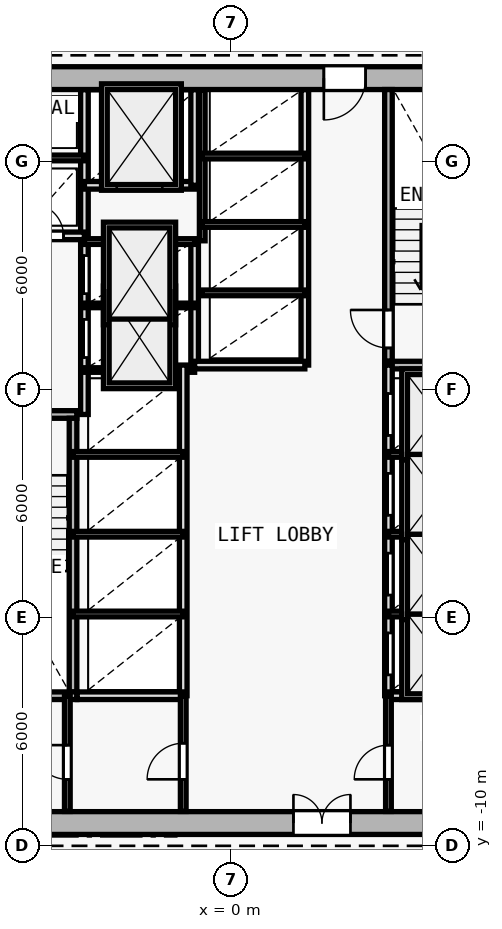
"""IFC4 building model, lengths in metres.
Left out: names, types, materials, properties, quantities, classifications, styles, units other than length and angle.
Written with IfcOpenShell. Run it as: python <this file> out.ifc"""

import sys

from ifc_helpers import new_model, si_unit, direction, frame, frame_2d, origin, origin_2d, place, context, subcontext, project, spatial, rectangle, i_section, extrude, element, fill, save


model = new_model("IFC4")
c1 = context("Model", 3, precision=1e-05, world=origin(), true_north=direction((0.0, 1.0)))
c2 = subcontext(c1, "Body", "Model", "MODEL_VIEW")
j1 = project(units=[si_unit("LENGTHUNIT", "METRE"), si_unit("PLANEANGLEUNIT", "RADIAN")], contexts=[c1])
p1 = place(None, origin())
s1 = spatial("IfcSite", under=j1, at=p1, CompositionType="ELEMENT")
p2 = place(p1, origin())
s2 = spatial("IfcBuilding", under=s1, at=p2, CompositionType="ELEMENT")
p3 = place(p2, frame((0.0, 0.0, 30.0)))
s3 = spatial("IfcBuildingStorey", under=s2, at=p3, CompositionType="ELEMENT", Elevation=30.0)
p4 = place(p3, frame((0.0, -9.4, 0.0), z_axis=(0.0, 0.0, 1.0), x_axis=(1.0, 0.0, 0.0)))
e1 = element("IfcColumn", 1, at=p4, inside=s3, PredefinedType="COLUMN", context=c2, shape_type="SweptSolid", body=[
    extrude(i_section(OverallWidth=0.416, OverallDepth=0.446, WebThickness=0.025, FlangeThickness=0.04, FilletRadius=0.015, at=origin_2d()), origin(), (0.0, 0.0, 1.0), 3.6),
])
p5 = place(p3, frame((-8.0, -9.4, 0.0), z_axis=(0.0, 0.0, 1.0), x_axis=(1.0, 0.0, 0.0)))
e2 = element("IfcWall", 2, at=p5, inside=s3, PredefinedType="SHEAR", context=c2, shape_type="SweptSolid", body=[
    extrude(rectangle(XDim=16.0, YDim=0.6, at=frame_2d((8.0, 0.0))), origin(), (0.0, 0.0, 1.0), 3.35),
])
p6 = place(p5, frame((9.65, 0.0, 0.0)))
e3 = element("IfcOpeningElement", 3, at=p6, cuts=e2, PredefinedType="OPENING", context=c2, shape_type="SweptSolid", body=[
    extrude(rectangle(XDim=1.5, YDim=2.2, at=frame_2d((0.75, 1.1))), frame((0.0, 0.31, 0.0), z_axis=(0.0, -1.0, 0.0), x_axis=(1.0, 0.0, 0.0)), (0.0, 0.0, 1.0), 0.62),
])
p7 = place(p3, frame((8.0, 10.2, 0.0), z_axis=(0.0, 0.0, 1.0), x_axis=(-1.0, 0.0, 0.0)))
e4 = element("IfcWall", 4, at=p7, inside=s3, PredefinedType="SHEAR", context=c2, shape_type="SweptSolid", body=[
    extrude(rectangle(XDim=16.0, YDim=0.6, at=frame_2d((8.0, 0.0))), origin(), (0.0, 0.0, 1.0), 3.35),
])
p8 = place(p7, frame((4.45, 0.0, 0.0)))
e5 = element("IfcOpeningElement", 5, at=p8, cuts=e4, PredefinedType="OPENING", context=c2, shape_type="SweptSolid", body=[
    extrude(rectangle(XDim=1.1, YDim=2.15, at=frame_2d((0.55, 1.075))), frame((0.0, 0.31, 0.0), z_axis=(0.0, -1.0, 0.0), x_axis=(1.0, 0.0, 0.0)), (0.0, 0.0, 1.0), 0.62),
])
p9 = place(p3, frame((-7.4, 1.35, 0.0), z_axis=(0.0, 0.0, 1.0), x_axis=(1.0, 0.0, 0.0)))
e6 = element("IfcWall", 6, at=p9, inside=s3, PredefinedType="SOLIDWALL", context=c2, shape_type="SweptSolid", body=[
    extrude(rectangle(XDim=3.35, YDim=0.2, at=frame_2d((1.675, 0.0))), origin(), (0.0, 0.0, 1.0), 3.35),
])
p10 = place(p9, frame((0.65, 0.0, 0.0)))
e7 = element("IfcOpeningElement", 7, at=p10, cuts=e6, PredefinedType="OPENING", context=c2, shape_type="SweptSolid", body=[
    extrude(rectangle(XDim=1.0, YDim=2.15, at=frame_2d((0.5, 1.075))), frame((0.0, 0.11, 0.0), z_axis=(0.0, -1.0, 0.0), x_axis=(1.0, 0.0, 0.0)), (0.0, 0.0, 1.0), 0.22),
])
p11 = place(p3, frame((-4.15, -5.95, 0.0), z_axis=(0.0, 0.0, 1.0), x_axis=(0.0, 1.0, 0.0)))
e8 = element("IfcWall", 8, at=p11, inside=s3, PredefinedType="SOLIDWALL", context=c2, shape_type="SweptSolid", body=[
    extrude(rectangle(XDim=7.2, YDim=0.2, at=frame_2d((3.6, 0.0))), origin(), (0.0, 0.0, 1.0), 3.35),
])
p12 = place(p3, frame((-3.85, 1.35, 0.0), z_axis=(0.0, 0.0, 1.0), x_axis=(0.0, 1.0, 0.0)))
e9 = element("IfcWall", 9, at=p12, inside=s3, PredefinedType="SOLIDWALL", context=c2, shape_type="SweptSolid", body=[
    extrude(rectangle(XDim=8.545, YDim=0.2, at=frame_2d((4.272, 0.0))), origin(), (0.0, 0.0, 1.0), 3.35),
])
p13 = place(p12, frame((1.5, 0.0, 0.0)))
e10 = element("IfcOpeningElement", 10, at=p13, cuts=e9, PredefinedType="OPENING", context=c2, shape_type="SweptSolid", body=[
    extrude(rectangle(XDim=1.0, YDim=2.15, at=frame_2d((0.5, 1.075))), frame((0.0, 0.11, 0.0), z_axis=(0.0, -1.0, 0.0), x_axis=(1.0, 0.0, 0.0)), (0.0, 0.0, 1.0), 0.22),
])
p14 = place(p12, frame((3.18, 0.0, 0.0)))
e11 = element("IfcOpeningElement", 11, at=p14, cuts=e9, PredefinedType="OPENING", context=c2, shape_type="SweptSolid", body=[
    extrude(rectangle(XDim=1.0, YDim=2.15, at=frame_2d((0.5, 1.075))), frame((0.0, 0.11, 0.0), z_axis=(0.0, -1.0, 0.0), x_axis=(1.0, 0.0, 0.0)), (0.0, 0.0, 1.0), 0.22),
])
p15 = place(p3, frame((-7.395, 6.05, 0.0), z_axis=(0.0, 0.0, 1.0), x_axis=(1.0, 0.0, 0.0)))
e12 = element("IfcWall", 12, at=p15, inside=s3, PredefinedType="SOLIDWALL", context=c2, shape_type="SweptSolid", body=[
    extrude(rectangle(XDim=3.545, YDim=0.2, at=frame_2d((1.772, 0.0))), origin(), (0.0, 0.0, 1.0), 3.35),
])
p16 = place(p15, frame((0.345, 0.0, 0.0)))
e13 = element("IfcOpeningElement", 13, at=p16, cuts=e12, PredefinedType="OPENING", context=c2, shape_type="SweptSolid", body=[
    extrude(rectangle(XDim=0.85, YDim=2.1, at=frame_2d((0.425, 1.05))), frame((0.0, 0.11, 0.0), z_axis=(0.0, -1.0, 0.0), x_axis=(1.0, 0.0, 0.0)), (0.0, 0.0, 1.0), 0.22),
])
p17 = place(p15, frame((2.145, 0.0, 0.0)))
e14 = element("IfcOpeningElement", 14, at=p17, cuts=e12, PredefinedType="OPENING", context=c2, shape_type="SweptSolid", body=[
    extrude(rectangle(XDim=0.85, YDim=2.1, at=frame_2d((0.425, 1.05))), frame((0.0, 0.11, 0.0), z_axis=(0.0, -1.0, 0.0), x_axis=(1.0, 0.0, 0.0)), (0.0, 0.0, 1.0), 0.22),
])
p18 = place(p3, frame((-7.395, 8.1, 0.0), z_axis=(0.0, 0.0, 1.0), x_axis=(1.0, 0.0, 0.0)))
e15 = element("IfcWall", 15, at=p18, inside=s3, PredefinedType="PARTITIONING", context=c2, shape_type="SweptSolid", body=[
    extrude(rectangle(XDim=3.545, YDim=0.15, at=frame_2d((1.772, 0.0))), origin(), (0.0, 0.0, 1.0), 3.35),
])
p19 = place(p3, frame((4.15, 2.75, 0.0), z_axis=(0.0, 0.0, 1.0), x_axis=(0.0, 1.0, 0.0)))
e16 = element("IfcWall", 16, at=p19, inside=s3, PredefinedType="SOLIDWALL", context=c2, shape_type="SweptSolid", body=[
    extrude(rectangle(XDim=7.15, YDim=0.2, at=frame_2d((3.575, 0.0))), origin(), (0.0, 0.0, 1.0), 3.35),
])
p20 = place(p19, frame((0.35, 0.0, 0.0)))
e17 = element("IfcOpeningElement", 17, at=p20, cuts=e16, PredefinedType="OPENING", context=c2, shape_type="SweptSolid", body=[
    extrude(rectangle(XDim=1.0, YDim=2.15, at=frame_2d((0.5, 1.075))), frame((0.0, 0.11, 0.0), z_axis=(0.0, -1.0, 0.0), x_axis=(1.0, 0.0, 0.0)), (0.0, 0.0, 1.0), 0.22),
])
p21 = place(p3, frame((4.05, 2.65, 0.0), z_axis=(0.0, 0.0, 1.0), x_axis=(1.0, 0.0, 0.0)))
e18 = element("IfcWall", 18, at=p21, inside=s3, PredefinedType="SOLIDWALL", context=c2, shape_type="SweptSolid", body=[
    extrude(rectangle(XDim=3.35, YDim=0.2, at=frame_2d((1.675, 0.0))), origin(), (0.0, 0.0, 1.0), 3.35),
])
p22 = place(p3, frame((-0.95, 2.65, 0.0), z_axis=(0.0, 0.0, 1.0), x_axis=(0.0, 1.0, 0.0)))
e19 = element("IfcWall", 19, at=p22, inside=s3, PredefinedType="SOLIDWALL", context=c2, shape_type="SweptSolid", body=[
    extrude(rectangle(XDim=3.27, YDim=0.2, at=frame_2d((1.635, 0.0))), origin(), (0.0, 0.0, 1.0), 3.35),
])
for number, where, z_axis, x_axis in (
    (20, (-3.85, 2.52, 0.0), (0.0, 0.0, 1.0), (1.0, 0.0, 0.0)),
    (21, (-3.85, 4.22, 0.0), (0.0, 0.0, 1.0), (1.0, 0.0, 0.0)),
):
    element("IfcWall", number, at=place(p3, frame(where, z_axis=z_axis, x_axis=x_axis)), inside=s3, PredefinedType="PARTITIONING", context=c2, shape_type="SweptSolid", body=[
        extrude(rectangle(XDim=2.9, YDim=0.12, at=frame_2d((1.45, 0.0))), origin(), (0.0, 0.0, 1.0), 3.35),
    ])
p23 = place(p3, frame((-3.85, 5.9, 0.0), z_axis=(0.0, 0.0, 1.0), x_axis=(1.0, 0.0, 0.0)))
e22 = element("IfcWall", 22, at=p23, inside=s3, PredefinedType="PARTITIONING", context=c2, shape_type="SweptSolid", body=[
    extrude(rectangle(XDim=2.9, YDim=0.15, at=frame_2d((1.45, 0.0))), origin(), (0.0, 0.0, 1.0), 3.35),
])
p24 = place(p3, frame((-3.85, 7.38, 0.0), z_axis=(0.0, 0.0, 1.0), x_axis=(1.0, 0.0, 0.0)))
e23 = element("IfcWall", 23, at=p24, inside=s3, PredefinedType="SOLIDWALL", context=c2, shape_type="SweptSolid", body=[
    extrude(rectangle(XDim=2.9, YDim=0.2, at=frame_2d((1.45, 0.0))), origin(), (0.0, 0.0, 1.0), 3.35),
])
p25 = place(p24, frame((0.85, 0.0, 0.0)))
e24 = element("IfcOpeningElement", 24, at=p25, cuts=e23, PredefinedType="OPENING", context=c2, shape_type="SweptSolid", body=[
    extrude(rectangle(XDim=1.2, YDim=2.2, at=frame_2d((0.6, 1.1))), frame((0.0, 0.11, 0.0), z_axis=(0.0, -1.0, 0.0), x_axis=(1.0, 0.0, 0.0)), (0.0, 0.0, 1.0), 0.22),
])
p26 = place(p3, frame((-0.95, 7.38, 0.0), z_axis=(0.0, 0.0, 1.0), x_axis=(0.0, 1.0, 0.0)))
e25 = element("IfcWall", 25, at=p26, inside=s3, PredefinedType="SOLIDWALL", context=c2, shape_type="SweptSolid", body=[
    extrude(rectangle(XDim=2.515, YDim=0.2, at=frame_2d((1.258, 0.0))), origin(), (0.0, 0.0, 1.0), 3.35),
])
p27 = place(p3, frame((4.15, -6.05, 0.0), z_axis=(0.0, 0.0, 1.0), x_axis=(0.0, 1.0, 0.0)))
e26 = element("IfcWall", 26, at=p27, inside=s3, PredefinedType="SOLIDWALL", context=c2, shape_type="SweptSolid", body=[
    extrude(rectangle(XDim=8.7, YDim=0.2, at=frame_2d((4.35, 0.0))), origin(), (0.0, 0.0, 1.0), 3.35),
])
p28 = place(p27, frame((0.55, 0.0, 0.0)))
e27 = element("IfcOpeningElement", 27, at=p28, cuts=e26, PredefinedType="OPENING", context=c2, shape_type="SweptSolid", body=[
    extrude(rectangle(XDim=1.1, YDim=2.15, at=frame_2d((0.55, 1.075))), frame((0.0, 0.11, 0.0), z_axis=(0.0, -1.0, 0.0), x_axis=(1.0, 0.0, 0.0)), (0.0, 0.0, 1.0), 0.22),
])
p29 = place(p27, frame((2.65, 0.0, 0.0)))
e28 = element("IfcOpeningElement", 28, at=p29, cuts=e26, PredefinedType="OPENING", context=c2, shape_type="SweptSolid", body=[
    extrude(rectangle(XDim=1.1, YDim=2.15, at=frame_2d((0.55, 1.075))), frame((0.0, 0.11, 0.0), z_axis=(0.0, -1.0, 0.0), x_axis=(1.0, 0.0, 0.0)), (0.0, 0.0, 1.0), 0.22),
])
p30 = place(p27, frame((4.75, 0.0, 0.0)))
e29 = element("IfcOpeningElement", 29, at=p30, cuts=e26, PredefinedType="OPENING", context=c2, shape_type="SweptSolid", body=[
    extrude(rectangle(XDim=1.1, YDim=2.15, at=frame_2d((0.55, 1.075))), frame((0.0, 0.11, 0.0), z_axis=(0.0, -1.0, 0.0), x_axis=(1.0, 0.0, 0.0)), (0.0, 0.0, 1.0), 0.22),
])
p31 = place(p27, frame((6.85, 0.0, 0.0)))
e30 = element("IfcOpeningElement", 30, at=p31, cuts=e26, PredefinedType="OPENING", context=c2, shape_type="SweptSolid", body=[
    extrude(rectangle(XDim=1.1, YDim=2.15, at=frame_2d((0.55, 1.075))), frame((0.0, 0.11, 0.0), z_axis=(0.0, -1.0, 0.0), x_axis=(1.0, 0.0, 0.0)), (0.0, 0.0, 1.0), 0.22),
])
for number, where, z_axis, x_axis in (
    (31, (4.15, -3.9, 0.0), (0.0, 0.0, 1.0), (1.0, 0.0, 0.0)),
    (32, (4.15, -1.8, 0.0), (0.0, 0.0, 1.0), (1.0, 0.0, 0.0)),
    (33, (4.15, 0.3, 0.0), (0.0, 0.0, 1.0), (1.0, 0.0, 0.0)),
):
    element("IfcWall", number, at=place(p3, frame(where, z_axis=z_axis, x_axis=x_axis)), inside=s3, PredefinedType="PARTITIONING", context=c2, shape_type="SweptSolid", body=[
        extrude(rectangle(XDim=2.6, YDim=0.15, at=frame_2d((1.3, 0.0))), origin(), (0.0, 0.0, 1.0), 3.35),
    ])
p32 = place(p3, frame((-1.25, -6.05, 0.0), z_axis=(0.0, 0.0, 1.0), x_axis=(0.0, 1.0, 0.0)))
e34 = element("IfcWall", 34, at=p32, inside=s3, PredefinedType="SOLIDWALL", context=c2, shape_type="SweptSolid", body=[
    extrude(rectangle(XDim=8.7, YDim=0.2, at=frame_2d((4.35, 0.0))), origin(), (0.0, 0.0, 1.0), 3.35),
])
for number, where, z_axis, x_axis in (
    (35, (-4.15, -3.9, 0.0), (0.0, 0.0, 1.0), (1.0, 0.0, 0.0)),
    (36, (-4.15, -1.8, 0.0), (0.0, 0.0, 1.0), (1.0, 0.0, 0.0)),
    (37, (-4.15, 0.3, 0.0), (0.0, 0.0, 1.0), (1.0, 0.0, 0.0)),
):
    element("IfcWall", number, at=place(p3, frame(where, z_axis=z_axis, x_axis=x_axis)), inside=s3, PredefinedType="PARTITIONING", context=c2, shape_type="SweptSolid", body=[
        extrude(rectangle(XDim=2.9, YDim=0.15, at=frame_2d((1.45, 0.0))), origin(), (0.0, 0.0, 1.0), 3.35),
    ])
p33 = place(p3, frame((1.95, 2.65, 0.0), z_axis=(0.0, 0.0, 1.0), x_axis=(0.0, 1.0, 0.0)))
e38 = element("IfcWall", 38, at=p33, inside=s3, PredefinedType="SOLIDWALL", context=c2, shape_type="SweptSolid", body=[
    extrude(rectangle(XDim=7.245, YDim=0.2, at=frame_2d((3.623, 0.0))), origin(), (0.0, 0.0, 1.0), 3.35),
])
p34 = place(p3, frame((-0.95, 2.65, 0.0), z_axis=(0.0, 0.0, 1.0), x_axis=(1.0, 0.0, 0.0)))
e39 = element("IfcWall", 39, at=p34, inside=s3, PredefinedType="SOLIDWALL", context=c2, shape_type="SweptSolid", body=[
    extrude(rectangle(XDim=2.9, YDim=0.2, at=frame_2d((1.45, 0.0))), origin(), (0.0, 0.0, 1.0), 3.35),
])
p35 = place(p3, frame((-0.75, 5.92, 0.0), z_axis=(0.0, 0.0, 1.0), x_axis=(0.0, 1.0, 0.0)))
e40 = element("IfcWall", 40, at=p35, inside=s3, PredefinedType="PARTITIONING", context=c2, shape_type="SweptSolid", body=[
    extrude(rectangle(XDim=3.975, YDim=0.15, at=frame_2d((1.988, 0.0))), origin(), (0.0, 0.0, 1.0), 3.35),
])
for number, where, z_axis, x_axis in (
    (41, (-0.75, 4.55, 0.0), (0.0, 0.0, 1.0), (1.0, 0.0, 0.0)),
    (42, (-0.75, 6.35, 0.0), (0.0, 0.0, 1.0), (1.0, 0.0, 0.0)),
    (43, (-0.75, 8.15, 0.0), (0.0, 0.0, 1.0), (1.0, 0.0, 0.0)),
):
    element("IfcWall", number, at=place(p3, frame(where, z_axis=z_axis, x_axis=x_axis)), inside=s3, PredefinedType="PARTITIONING", context=c2, shape_type="SweptSolid", body=[
        extrude(rectangle(XDim=2.7, YDim=0.15, at=frame_2d((1.35, 0.0))), origin(), (0.0, 0.0, 1.0), 3.35),
    ])
p36 = place(p3, frame((-7.4, -6.05, 0.0), z_axis=(0.0, 0.0, 1.0), x_axis=(1.0, 0.0, 0.0)))
e44 = element("IfcWall", 44, at=p36, inside=s3, PredefinedType="SOLIDWALL", context=c2, shape_type="SweptSolid", body=[
    extrude(rectangle(XDim=3.35, YDim=0.2, at=frame_2d((1.675, 0.0))), origin(), (0.0, 0.0, 1.0), 3.35),
])
p37 = place(p3, frame((-4.04, -6.05, 0.0), z_axis=(0.0, 0.0, 1.0), x_axis=(1.0, 0.0, 0.0)))
e45 = element("IfcWall", 45, at=p37, inside=s3, PredefinedType="SOLIDWALL", context=c2, shape_type="SweptSolid", body=[
    extrude(rectangle(XDim=2.79, YDim=0.2, at=frame_2d((1.395, 0.0))), origin(), (0.0, 0.0, 1.0), 3.35),
])
p38 = place(p3, frame((4.15, -6.05, 0.0), z_axis=(0.0, 0.0, 1.0), x_axis=(1.0, 0.0, 0.0)))
e46 = element("IfcWall", 46, at=p38, inside=s3, PredefinedType="SOLIDWALL", context=c2, shape_type="SweptSolid", body=[
    extrude(rectangle(XDim=3.245, YDim=0.2, at=frame_2d((1.623, 0.0))), origin(), (0.0, 0.0, 1.0), 3.35),
])
p39 = place(p3, frame((-1.25, -9.095, 0.0), z_axis=(0.0, 0.0, 1.0), x_axis=(0.0, 1.0, 0.0)))
e47 = element("IfcWall", 47, at=p39, inside=s3, PredefinedType="PARTITIONING", context=c2, shape_type="SweptSolid", body=[
    extrude(rectangle(XDim=3.045, YDim=0.15, at=frame_2d((1.522, 0.0))), origin(), (0.0, 0.0, 1.0), 3.35),
])
p40 = place(p39, frame((0.845, 0.0, 0.0)))
e48 = element("IfcOpeningElement", 48, at=p40, cuts=e47, PredefinedType="OPENING", context=c2, shape_type="SweptSolid", body=[
    extrude(rectangle(XDim=0.95, YDim=2.1, at=frame_2d((0.475, 1.05))), frame((0.0, 0.085, 0.0), z_axis=(0.0, -1.0, 0.0), x_axis=(1.0, 0.0, 0.0)), (0.0, 0.0, 1.0), 0.17),
])
p41 = place(p3, frame((4.15, -9.095, 0.0), z_axis=(0.0, 0.0, 1.0), x_axis=(0.0, 1.0, 0.0)))
e49 = element("IfcWall", 49, at=p41, inside=s3, PredefinedType="PARTITIONING", context=c2, shape_type="SweptSolid", body=[
    extrude(rectangle(XDim=3.045, YDim=0.15, at=frame_2d((1.522, 0.0))), origin(), (0.0, 0.0, 1.0), 3.35),
])
p42 = place(p41, frame((0.845, 0.0, 0.0)))
e50 = element("IfcOpeningElement", 50, at=p42, cuts=e49, PredefinedType="OPENING", context=c2, shape_type="SweptSolid", body=[
    extrude(rectangle(XDim=0.9, YDim=2.1, at=frame_2d((0.45, 1.05))), frame((0.0, 0.085, 0.0), z_axis=(0.0, -1.0, 0.0), x_axis=(1.0, 0.0, 0.0)), (0.0, 0.0, 1.0), 0.17),
])
p43 = place(p3, frame((-4.3, -9.095, 0.0), z_axis=(0.0, 0.0, 1.0), x_axis=(0.0, 1.0, 0.0)))
e51 = element("IfcWall", 51, at=p43, inside=s3, PredefinedType="PARTITIONING", context=c2, shape_type="SweptSolid", body=[
    extrude(rectangle(XDim=3.045, YDim=0.15, at=frame_2d((1.522, 0.0))), origin(), (0.0, 0.0, 1.0), 3.35),
])
p44 = place(p43, frame((0.845, 0.0, 0.0)))
e52 = element("IfcOpeningElement", 52, at=p44, cuts=e51, PredefinedType="OPENING", context=c2, shape_type="SweptSolid", body=[
    extrude(rectangle(XDim=0.9, YDim=2.1, at=frame_2d((0.45, 1.05))), frame((0.0, 0.085, 0.0), z_axis=(0.0, -1.0, 0.0), x_axis=(1.0, 0.0, 0.0)), (0.0, 0.0, 1.0), 0.17),
])
p45 = place(p6, origin())
e53 = element("IfcDoor", 53, at=p45, inside=s3, OperationType="DOUBLE_DOOR_SINGLE_SWING", PredefinedType="DOOR", context=c2, shape_type="SweptSolid", body=[
    extrude(rectangle(XDim=1.5, YDim=2.2, at=frame_2d((0.75, 1.1))), frame((0.0, 0.025, 0.0), z_axis=(0.0, -1.0, 0.0), x_axis=(1.0, 0.0, 0.0)), (0.0, 0.0, 1.0), 0.05),
])
fill(e3, e53)
p46 = place(p8, origin())
e54 = element("IfcDoor", 54, at=p46, inside=s3, OperationType="SINGLE_SWING_RIGHT", PredefinedType="DOOR", context=c2, shape_type="SweptSolid", body=[
    extrude(rectangle(XDim=1.1, YDim=2.15, at=frame_2d((0.55, 1.075))), frame((0.0, 0.025, 0.0), z_axis=(0.0, -1.0, 0.0), x_axis=(1.0, 0.0, 0.0)), (0.0, 0.0, 1.0), 0.05),
])
fill(e5, e54)
p47 = place(p17, origin())
e55 = element("IfcDoor", 55, at=p47, inside=s3, OperationType="SINGLE_SWING_LEFT", PredefinedType="DOOR", context=c2, shape_type="SweptSolid", body=[
    extrude(rectangle(XDim=0.85, YDim=2.1, at=frame_2d((0.425, 1.05))), frame((0.0, 0.025, 0.0), z_axis=(0.0, -1.0, 0.0), x_axis=(1.0, 0.0, 0.0)), (0.0, 0.0, 1.0), 0.05),
])
fill(e14, e55)
p48 = place(p20, origin())
e56 = element("IfcDoor", 56, at=p48, inside=s3, OperationType="SINGLE_SWING_RIGHT", PredefinedType="DOOR", context=c2, shape_type="SweptSolid", body=[
    extrude(rectangle(XDim=1.0, YDim=2.15, at=frame_2d((0.5, 1.075))), frame((0.0, 0.025, 0.0), z_axis=(0.0, -1.0, 0.0), x_axis=(1.0, 0.0, 0.0)), (0.0, 0.0, 1.0), 0.05),
])
fill(e17, e56)
p49 = place(p25, origin())
e57 = element("IfcDoor", 57, at=p49, inside=s3, OperationType="DOUBLE_DOOR_SLIDING", PredefinedType="DOOR", context=c2, shape_type="SweptSolid", body=[
    extrude(rectangle(XDim=1.2, YDim=2.2, at=frame_2d((0.6, 1.1))), frame((0.0, 0.025, 0.0), z_axis=(0.0, -1.0, 0.0), x_axis=(1.0, 0.0, 0.0)), (0.0, 0.0, 1.0), 0.05),
])
fill(e24, e57)
p50 = place(p28, origin())
e58 = element("IfcDoor", 58, at=p50, inside=s3, OperationType="DOUBLE_DOOR_SLIDING", PredefinedType="DOOR", context=c2, shape_type="SweptSolid", body=[
    extrude(rectangle(XDim=1.1, YDim=2.15, at=frame_2d((0.55, 1.075))), frame((0.0, 0.025, 0.0), z_axis=(0.0, -1.0, 0.0), x_axis=(1.0, 0.0, 0.0)), (0.0, 0.0, 1.0), 0.05),
])
fill(e27, e58)
p51 = place(p29, origin())
e59 = element("IfcDoor", 59, at=p51, inside=s3, OperationType="DOUBLE_DOOR_SLIDING", PredefinedType="DOOR", context=c2, shape_type="SweptSolid", body=[
    extrude(rectangle(XDim=1.1, YDim=2.15, at=frame_2d((0.55, 1.075))), frame((0.0, 0.025, 0.0), z_axis=(0.0, -1.0, 0.0), x_axis=(1.0, 0.0, 0.0)), (0.0, 0.0, 1.0), 0.05),
])
fill(e28, e59)
p52 = place(p30, origin())
e60 = element("IfcDoor", 60, at=p52, inside=s3, OperationType="DOUBLE_DOOR_SLIDING", PredefinedType="DOOR", context=c2, shape_type="SweptSolid", body=[
    extrude(rectangle(XDim=1.1, YDim=2.15, at=frame_2d((0.55, 1.075))), frame((0.0, 0.025, 0.0), z_axis=(0.0, -1.0, 0.0), x_axis=(1.0, 0.0, 0.0)), (0.0, 0.0, 1.0), 0.05),
])
fill(e29, e60)
p53 = place(p31, origin())
e61 = element("IfcDoor", 61, at=p53, inside=s3, OperationType="DOUBLE_DOOR_SLIDING", PredefinedType="DOOR", context=c2, shape_type="SweptSolid", body=[
    extrude(rectangle(XDim=1.1, YDim=2.15, at=frame_2d((0.55, 1.075))), frame((0.0, 0.025, 0.0), z_axis=(0.0, -1.0, 0.0), x_axis=(1.0, 0.0, 0.0)), (0.0, 0.0, 1.0), 0.05),
])
fill(e30, e61)
p54 = place(p13, origin())
e62 = element("IfcDoor", 62, at=p54, inside=s3, OperationType="DOUBLE_DOOR_SLIDING", PredefinedType="DOOR", context=c2, shape_type="SweptSolid", body=[
    extrude(rectangle(XDim=1.0, YDim=2.15, at=frame_2d((0.5, 1.075))), frame((0.0, 0.025, 0.0), z_axis=(0.0, -1.0, 0.0), x_axis=(1.0, 0.0, 0.0)), (0.0, 0.0, 1.0), 0.05),
])
fill(e10, e62)
p55 = place(p14, origin())
e63 = element("IfcDoor", 63, at=p55, inside=s3, OperationType="DOUBLE_DOOR_SLIDING", PredefinedType="DOOR", context=c2, shape_type="SweptSolid", body=[
    extrude(rectangle(XDim=1.0, YDim=2.15, at=frame_2d((0.5, 1.075))), frame((0.0, 0.025, 0.0), z_axis=(0.0, -1.0, 0.0), x_axis=(1.0, 0.0, 0.0)), (0.0, 0.0, 1.0), 0.05),
])
fill(e11, e63)
p56 = place(p40, origin())
e64 = element("IfcDoor", 64, at=p56, inside=s3, OperationType="SINGLE_SWING_LEFT", PredefinedType="DOOR", context=c2, shape_type="SweptSolid", body=[
    extrude(rectangle(XDim=0.95, YDim=2.1, at=frame_2d((0.475, 1.05))), frame((0.0, 0.025, 0.0), z_axis=(0.0, -1.0, 0.0), x_axis=(1.0, 0.0, 0.0)), (0.0, 0.0, 1.0), 0.05),
])
fill(e48, e64)
p57 = place(p44, origin())
e65 = element("IfcDoor", 65, at=p57, inside=s3, OperationType="SINGLE_SWING_RIGHT", PredefinedType="DOOR", context=c2, shape_type="SweptSolid", body=[
    extrude(rectangle(XDim=0.9, YDim=2.1, at=frame_2d((0.45, 1.05))), frame((0.0, 0.025, 0.0), z_axis=(0.0, -1.0, 0.0), x_axis=(1.0, 0.0, 0.0)), (0.0, 0.0, 1.0), 0.05),
])
fill(e52, e65)
p58 = place(p42, origin())
e66 = element("IfcDoor", 66, at=p58, inside=s3, OperationType="SINGLE_SWING_LEFT", PredefinedType="DOOR", context=c2, shape_type="SweptSolid", body=[
    extrude(rectangle(XDim=0.9, YDim=2.1, at=frame_2d((0.45, 1.05))), frame((0.0, 0.025, 0.0), z_axis=(0.0, -1.0, 0.0), x_axis=(1.0, 0.0, 0.0)), (0.0, 0.0, 1.0), 0.05),
])
fill(e50, e66)
save(model, sys.argv[1])
